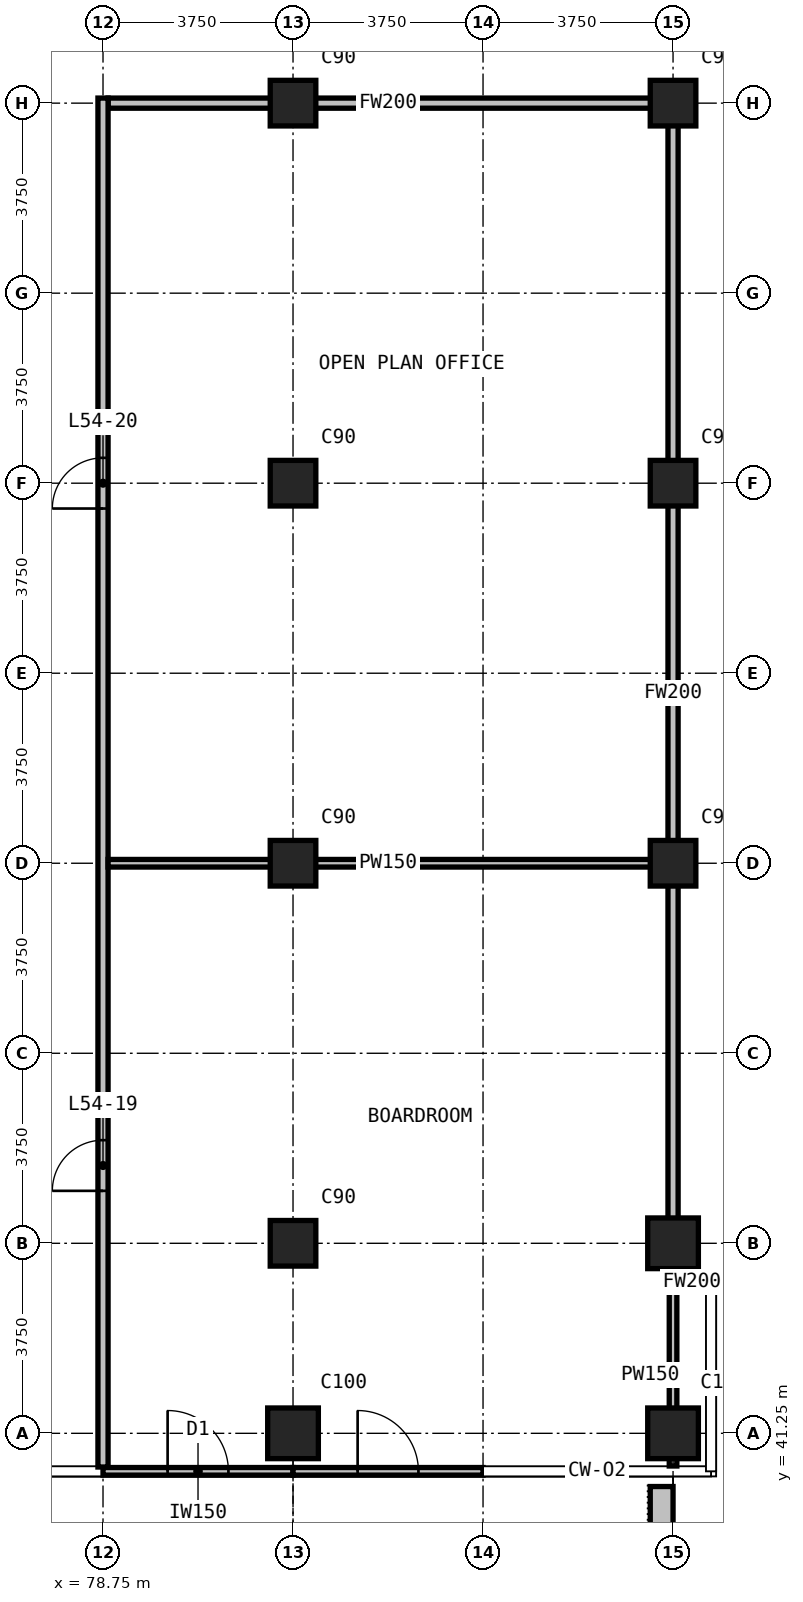
"""IFC4 building model, lengths in metres.
Left out: names, types, materials, properties, quantities, classifications, styles, units other than length and angle.
Written with IfcOpenShell. Run it as: python <this file> out.ifc"""

import sys

from ifc_helpers import new_model, si_unit, direction, frame, frame_2d, origin, origin_2d, place, context, subcontext, project, spatial, rectangle, extrude, element, fill, save


model = new_model("IFC4")
c1 = context("Model", 3, precision=1e-05, world=origin(), true_north=direction((0.0, 1.0)))
c2 = subcontext(c1, "Body", "Model", "MODEL_VIEW")
j1 = project(units=[si_unit("LENGTHUNIT", "METRE"), si_unit("PLANEANGLEUNIT", "RADIAN")], contexts=[c1])
p1 = place(None, origin())
s1 = spatial("IfcSite", under=j1, at=p1, CompositionType="ELEMENT")
p2 = place(p1, origin())
s2 = spatial("IfcBuilding", under=s1, at=p2, CompositionType="ELEMENT")
p3 = place(p2, frame((0.0, 0.0, 210.3)))
s3 = spatial("IfcBuildingStorey", under=s2, at=p3, CompositionType="ELEMENT", Elevation=210.3)
p4 = place(p3, frame((82.5, 41.25, 0.0), z_axis=(0.0, 0.0, 1.0), x_axis=(1.0, 0.0, 0.0)))
e1 = element("IfcColumn", 1, at=p4, inside=s3, PredefinedType="COLUMN", context=c2, shape_type="SweptSolid", body=[
    extrude(rectangle(XDim=1.0, YDim=1.0, at=origin_2d()), origin(), (0.0, 0.0, 1.0), 3.6),
])
for number, where, z_axis, x_axis in (
    (2, (82.5, 45.0, 0.0), (0.0, 0.0, 1.0), (1.0, 0.0, 0.0)),
    (3, (82.5, 52.5, 0.0), (0.0, 0.0, 1.0), (1.0, 0.0, 0.0)),
    (4, (82.5, 60.0, 0.0), (0.0, 0.0, 1.0), (1.0, 0.0, 0.0)),
    (5, (82.5, 67.5, 0.0), (0.0, 0.0, 1.0), (1.0, 0.0, 0.0)),
):
    element("IfcColumn", number, at=place(p3, frame(where, z_axis=z_axis, x_axis=x_axis)), inside=s3, PredefinedType="COLUMN", context=c2, shape_type="SweptSolid", body=[
        extrude(rectangle(XDim=0.9, YDim=0.9, at=origin_2d()), origin(), (0.0, 0.0, 1.0), 3.6),
    ])
for number, where, z_axis, x_axis in (
    (6, (90.0, 41.25, 0.0), (0.0, 0.0, 1.0), (1.0, 0.0, 0.0)),
    (7, (90.0, 45.0, 0.0), (0.0, 0.0, 1.0), (1.0, 0.0, 0.0)),
):
    element("IfcColumn", number, at=place(p3, frame(where, z_axis=z_axis, x_axis=x_axis)), inside=s3, PredefinedType="COLUMN", context=c2, shape_type="SweptSolid", body=[
        extrude(rectangle(XDim=1.0, YDim=1.0, at=origin_2d()), origin(), (0.0, 0.0, 1.0), 3.6),
    ])
for number, where, z_axis, x_axis in (
    (8, (90.0, 52.5, 0.0), (0.0, 0.0, 1.0), (1.0, 0.0, 0.0)),
    (9, (90.0, 60.0, 0.0), (0.0, 0.0, 1.0), (1.0, 0.0, 0.0)),
    (10, (90.0, 67.5, 0.0), (0.0, 0.0, 1.0), (1.0, 0.0, 0.0)),
):
    element("IfcColumn", number, at=place(p3, frame(where, z_axis=z_axis, x_axis=x_axis)), inside=s3, PredefinedType="COLUMN", context=c2, shape_type="SweptSolid", body=[
        extrude(rectangle(XDim=0.9, YDim=0.9, at=origin_2d()), origin(), (0.0, 0.0, 1.0), 3.6),
    ])
p5 = place(p3, frame((78.75, 40.5, 0.0), z_axis=(0.0, 0.0, 1.0), x_axis=(1.0, 0.0, 0.0)))
e11 = element("IfcWall", 11, at=p5, inside=s3, PredefinedType="SOLIDWALL", context=c2, shape_type="SweptSolid", body=[
    extrude(rectangle(XDim=3.75, YDim=0.15, at=frame_2d((1.875, 0.0))), origin(), (0.0, 0.0, 1.0), 3.3),
])
p6 = place(p5, frame((1.275, 0.0, 0.0)))
e12 = element("IfcOpeningElement", 12, at=p6, cuts=e11, PredefinedType="OPENING", context=c2, shape_type="SweptSolid", body=[
    extrude(rectangle(XDim=1.2, YDim=2.4, at=frame_2d((0.6, 1.2))), frame((0.0, 0.085, 0.0), z_axis=(0.0, -1.0, 0.0), x_axis=(1.0, 0.0, 0.0)), (0.0, 0.0, 1.0), 0.17),
])
p7 = place(p3, frame((82.5, 40.5, 0.0), z_axis=(0.0, 0.0, 1.0), x_axis=(1.0, 0.0, 0.0)))
e13 = element("IfcWall", 13, at=p7, inside=s3, PredefinedType="SOLIDWALL", context=c2, shape_type="SweptSolid", body=[
    extrude(rectangle(XDim=3.75, YDim=0.15, at=frame_2d((1.875, 0.0))), origin(), (0.0, 0.0, 1.0), 3.3),
])
p8 = place(p7, frame((1.275, 0.0, 0.0)))
e14 = element("IfcOpeningElement", 14, at=p8, cuts=e13, PredefinedType="OPENING", context=c2, shape_type="SweptSolid", body=[
    extrude(rectangle(XDim=1.2, YDim=2.4, at=frame_2d((0.6, 1.2))), frame((0.0, 0.085, 0.0), z_axis=(0.0, -1.0, 0.0), x_axis=(1.0, 0.0, 0.0)), (0.0, 0.0, 1.0), 0.17),
])
p9 = place(p3, frame((89.775, 40.2, 0.0), z_axis=(0.0, 0.0, 1.0), x_axis=(0.0, -1.0, 0.0)))
e15 = element("IfcWall", 15, at=p9, inside=s3, PredefinedType="USERDEFINED", context=c2, shape_type="SweptSolid", body=[
    extrude(rectangle(XDim=2.35, YDim=0.45, at=frame_2d((1.175, 0.0))), origin(), (0.0, 0.0, 1.0), 1.1),
])
p10 = place(p3, frame((90.1, 44.235, 0.0), z_axis=(0.0, 0.0, 1.0), x_axis=(1.0, 0.0, 0.0)))
e16 = element("IfcWall", 16, at=p10, inside=s3, PredefinedType="PARTITIONING", context=c2, shape_type="SweptSolid", body=[
    extrude(rectangle(XDim=0.545, YDim=0.2, at=frame_2d((0.272, 0.0))), origin(), (0.0, 0.0, 1.0), 3.3),
])
p11 = place(p3, frame((78.85, 67.5, 0.0), z_axis=(0.0, 0.0, 1.0), x_axis=(1.0, 0.0, 0.0)))
e17 = element("IfcWall", 17, at=p11, inside=s3, PredefinedType="PARTITIONING", context=c2, shape_type="SweptSolid", body=[
    extrude(rectangle(XDim=11.05, YDim=0.2, at=frame_2d((5.525, 0.0))), origin(), (0.0, 0.0, 1.0), 3.3),
])
p12 = place(p3, frame((78.75, 40.585, 0.0), z_axis=(0.0, 0.0, 1.0), x_axis=(0.0, 1.0, 0.0)))
e18 = element("IfcWall", 18, at=p12, inside=s3, PredefinedType="PARTITIONING", context=c2, shape_type="SweptSolid", body=[
    extrude(rectangle(XDim=27.015, YDim=0.2, at=frame_2d((13.508, 0.0))), origin(), (0.0, 0.0, 1.0), 3.3),
])
p13 = place(p12, frame((5.45, 0.0, 0.0)))
e19 = element("IfcOpeningElement", 19, at=p13, cuts=e18, PredefinedType="OPENING", context=c2, shape_type="SweptSolid", body=[
    extrude(rectangle(XDim=1.0, YDim=2.2, at=frame_2d((0.5, 1.1))), frame((0.0, 0.11, 0.0), z_axis=(0.0, -1.0, 0.0), x_axis=(1.0, 0.0, 0.0)), (0.0, 0.0, 1.0), 0.22),
])
p14 = place(p12, frame((18.915, 0.0, 0.0)))
e20 = element("IfcOpeningElement", 20, at=p14, cuts=e18, PredefinedType="OPENING", context=c2, shape_type="SweptSolid", body=[
    extrude(rectangle(XDim=1.0, YDim=2.2, at=frame_2d((0.5, 1.1))), frame((0.0, 0.11, 0.0), z_axis=(0.0, -1.0, 0.0), x_axis=(1.0, 0.0, 0.0)), (0.0, 0.0, 1.0), 0.22),
])
p15 = place(p3, frame((90.0, 44.135, 0.0), z_axis=(0.0, 0.0, 1.0), x_axis=(0.0, 1.0, 0.0)))
e21 = element("IfcWall", 21, at=p15, inside=s3, PredefinedType="PARTITIONING", context=c2, shape_type="SweptSolid", body=[
    extrude(rectangle(XDim=23.465, YDim=0.2, at=frame_2d((11.732, 0.0))), origin(), (0.0, 0.0, 1.0), 3.3),
])
p16 = place(p3, frame((78.85, 52.5, 0.0), z_axis=(0.0, 0.0, 1.0), x_axis=(1.0, 0.0, 0.0)))
e22 = element("IfcWall", 22, at=p16, inside=s3, PredefinedType="PARTITIONING", context=c2, shape_type="SweptSolid", body=[
    extrude(rectangle(XDim=11.05, YDim=0.15, at=frame_2d((5.525, 0.0))), origin(), (0.0, 0.0, 1.0), 3.3),
])
p17 = place(p3, frame((90.0, 40.605, 0.0), z_axis=(0.0, 0.0, 1.0), x_axis=(0.0, 1.0, 0.0)))
e23 = element("IfcWall", 23, at=p17, inside=s3, PredefinedType="PARTITIONING", context=c2, shape_type="SweptSolid", body=[
    extrude(rectangle(XDim=3.6, YDim=0.15, at=frame_2d((1.8, 0.0))), origin(), (0.0, 0.0, 1.0), 3.3),
])
p18 = place(p6, origin())
e24 = element("IfcDoor", 24, at=p18, inside=s3, OperationType="SINGLE_SWING_LEFT", PredefinedType="DOOR", context=c2, shape_type="SweptSolid", body=[
    extrude(rectangle(XDim=1.2, YDim=2.4, at=frame_2d((0.6, 1.2))), frame((0.0, 0.025, 0.0), z_axis=(0.0, -1.0, 0.0), x_axis=(1.0, 0.0, 0.0)), (0.0, 0.0, 1.0), 0.05),
])
fill(e12, e24)
p19 = place(p8, origin())
e25 = element("IfcDoor", 25, at=p19, inside=s3, OperationType="SINGLE_SWING_LEFT", PredefinedType="DOOR", context=c2, shape_type="SweptSolid", body=[
    extrude(rectangle(XDim=1.2, YDim=2.4, at=frame_2d((0.6, 1.2))), frame((0.0, 0.025, 0.0), z_axis=(0.0, -1.0, 0.0), x_axis=(1.0, 0.0, 0.0)), (0.0, 0.0, 1.0), 0.05),
])
fill(e14, e25)
p20 = place(p13, origin())
e26 = element("IfcDoor", 26, at=p20, inside=s3, OperationType="SINGLE_SWING_RIGHT", PredefinedType="DOOR", context=c2, shape_type="SweptSolid", body=[
    extrude(rectangle(XDim=1.0, YDim=2.2, at=frame_2d((0.5, 1.1))), frame((0.0, 0.025, 0.0), z_axis=(0.0, -1.0, 0.0), x_axis=(1.0, 0.0, 0.0)), (0.0, 0.0, 1.0), 0.05),
])
fill(e19, e26)
p21 = place(p14, origin())
e27 = element("IfcDoor", 27, at=p21, inside=s3, OperationType="SINGLE_SWING_LEFT", PredefinedType="DOOR", context=c2, shape_type="SweptSolid", body=[
    extrude(rectangle(XDim=1.0, YDim=2.2, at=frame_2d((0.5, 1.1))), frame((0.0, 0.025, 0.0), z_axis=(0.0, -1.0, 0.0), x_axis=(1.0, 0.0, 0.0)), (0.0, 0.0, 1.0), 0.05),
])
fill(e20, e27)
save(model, sys.argv[1])
